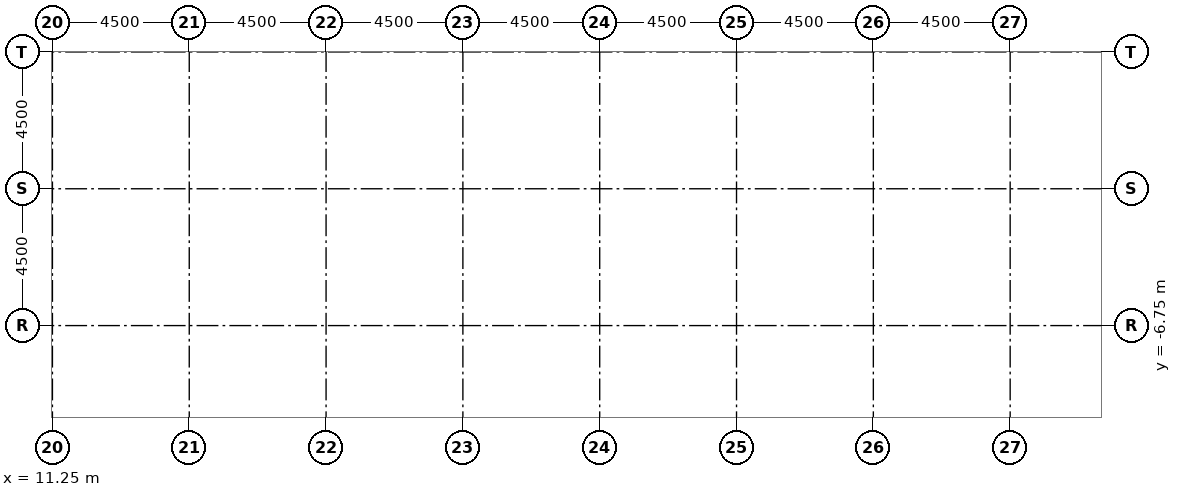
"""IFC4 building model, lengths in metres.
Left out: names, types, materials, properties, quantities, classifications, styles, units other than length and angle.
Written with IfcOpenShell. Run it as: python <this file> out.ifc"""

import sys

from ifc_helpers import new_model, si_unit, direction, frame, origin, origin_2d, place, context, subcontext, project, spatial, rectangle, extrude, element, save


model = new_model("IFC4")
c1 = context("Model", 3, precision=1e-05, world=origin(), true_north=direction((0.0, 1.0)))
c2 = subcontext(c1, "Body", "Model", "MODEL_VIEW")
j1 = project(units=[si_unit("LENGTHUNIT", "METRE"), si_unit("PLANEANGLEUNIT", "RADIAN")], contexts=[c1])
p1 = place(None, origin())
s1 = spatial("IfcSite", under=j1, at=p1, CompositionType="ELEMENT")
p2 = place(p1, origin())
s2 = spatial("IfcBuilding", under=s1, at=p2, CompositionType="ELEMENT")
p3 = place(p2, frame((0.0, 0.0, -4.0)))
s3 = spatial("IfcBuildingStorey", under=s2, at=p3, CompositionType="ELEMENT", Elevation=-4.0)
for number, where, z_axis, x_axis in (
    (1, (10.75, -6.25, 0.0), (0.0, 0.0, 1.0), (1.0, 0.0, 0.0)),
    (2, (15.75, -6.25, 0.0), (0.0, 0.0, 1.0), (1.0, 0.0, 0.0)),
    (3, (20.25, -6.11, 0.0), (0.0, 0.0, 1.0), (1.0, 0.0, 0.0)),
    (4, (24.75, -6.11, 0.0), (0.0, 0.0, 1.0), (1.0, 0.0, 0.0)),
    (5, (28.908, -5.475, 0.0), (0.0, 0.0, 1.0), (1.0, 0.0, 0.0)),
    (6, (28.67, -2.25, 0.0), (0.0, 0.0, 1.0), (1.0, 0.0, 0.0)),
    (7, (28.67, 2.25, 0.0), (0.0, 0.0, 1.0), (1.0, 0.0, 0.0)),
    (8, (33.11, -2.25, 0.0), (0.0, 0.0, 1.0), (1.0, 0.0, 0.0)),
    (9, (33.11, 2.25, 0.0), (0.0, 0.0, 1.0), (1.0, 0.0, 0.0)),
):
    element("IfcColumn", number, at=place(p3, frame(where, z_axis=z_axis, x_axis=x_axis)), inside=s3, PredefinedType="COLUMN", context=c2, shape_type="SweptSolid", body=[
        extrude(rectangle(XDim=1.2, YDim=1.2, at=origin_2d()), origin(), (0.0, 0.0, 1.0), 3.1),
    ])
save(model, sys.argv[1])
